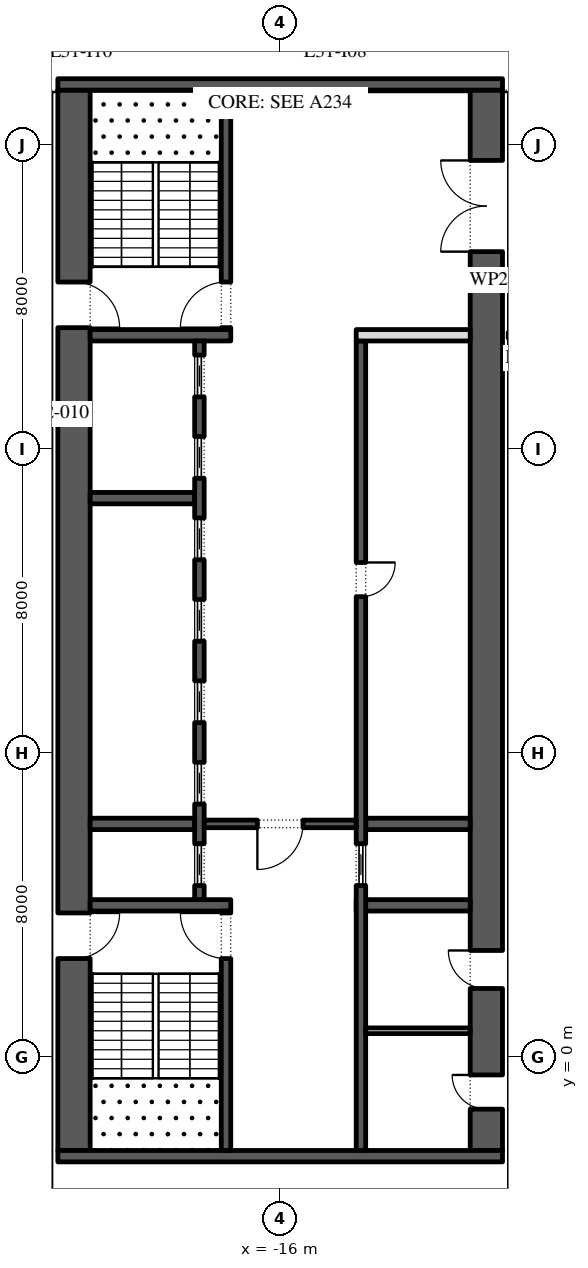
"""IFC4 building model, lengths in metres.
Left out: names, types, materials, properties, quantities, classifications, styles, units other than length and angle.
Written with IfcOpenShell. Run it as: python <this file> out.ifc"""

import sys

from ifc_helpers import new_model, si_unit, direction, frame, frame_2d, origin, place, context, subcontext, project, spatial, rectangle, extrude, element, fill, save


model = new_model("IFC4")
c1 = context("Model", 3, precision=1e-05, world=origin(), true_north=direction((0.0, 1.0)))
c2 = subcontext(c1, "Body", "Model", "MODEL_VIEW")
j1 = project(units=[si_unit("LENGTHUNIT", "METRE"), si_unit("PLANEANGLEUNIT", "RADIAN")], contexts=[c1])
p1 = place(None, origin())
s1 = spatial("IfcSite", under=j1, at=p1, CompositionType="ELEMENT")
p2 = place(p1, origin())
s2 = spatial("IfcBuilding", under=s1, at=p2, CompositionType="ELEMENT")
p3 = place(p2, frame((0.0, 0.0, 143.4)))
s3 = spatial("IfcBuildingStorey", under=s2, at=p3, CompositionType="ELEMENT", Elevation=143.4)
p4 = place(p3, frame((-21.425, -2.45, 0.0), z_axis=(0.0, 0.0, 1.0), x_axis=(0.0, 1.0, 0.0)))
e1 = element("IfcWall", 1, at=p4, inside=s3, PredefinedType="SHEAR", context=c2, shape_type="SweptSolid", body=[
    extrude(rectangle(XDim=27.9, YDim=0.85, at=frame_2d((13.95, 0.0))), origin(), (0.0, 0.0, 1.0), 4.0),
])
p5 = place(p4, frame((5.05, 0.0, 0.0)))
e2 = element("IfcOpeningElement", 2, at=p5, cuts=e1, PredefinedType="OPENING", context=c2, shape_type="SweptSolid", body=[
    extrude(rectangle(XDim=1.2, YDim=2.1, at=frame_2d((0.6, 1.05))), frame((0.0, 0.435, 0.0), z_axis=(0.0, -1.0, 0.0), x_axis=(1.0, 0.0, 0.0)), (0.0, 0.0, 1.0), 0.87),
])
p6 = place(p4, frame((21.65, 0.0, 0.0)))
e3 = element("IfcOpeningElement", 3, at=p6, cuts=e1, PredefinedType="OPENING", context=c2, shape_type="SweptSolid", body=[
    extrude(rectangle(XDim=1.2, YDim=2.1, at=frame_2d((0.6, 1.05))), frame((0.0, 0.435, 0.0), z_axis=(0.0, -1.0, 0.0), x_axis=(1.0, 0.0, 0.0)), (0.0, 0.0, 1.0), 0.87),
])
p7 = place(p3, frame((-10.575, -2.45, 0.0), z_axis=(0.0, 0.0, 1.0), x_axis=(0.0, 1.0, 0.0)))
e4 = element("IfcWall", 4, at=p7, inside=s3, PredefinedType="SHEAR", context=c2, shape_type="SweptSolid", body=[
    extrude(rectangle(XDim=27.9, YDim=0.85, at=frame_2d((13.95, 0.0))), origin(), (0.0, 0.0, 1.0), 4.0),
])
p8 = place(p7, frame((23.65, 0.0, 0.0)))
e5 = element("IfcOpeningElement", 5, at=p8, cuts=e4, PredefinedType="OPENING", context=c2, shape_type="SweptSolid", body=[
    extrude(rectangle(XDim=2.4, YDim=2.1, at=frame_2d((1.2, 1.05))), frame((0.0, 0.435, 0.0), z_axis=(0.0, -1.0, 0.0), x_axis=(1.0, 0.0, 0.0)), (0.0, 0.0, 1.0), 0.87),
])
p9 = place(p7, frame((1.087, 0.0, 0.0)))
e6 = element("IfcOpeningElement", 6, at=p9, cuts=e4, PredefinedType="OPENING", context=c2, shape_type="SweptSolid", body=[
    extrude(rectangle(XDim=0.9, YDim=2.1, at=frame_2d((0.45, 1.05))), frame((0.0, 0.435, 0.0), z_axis=(0.0, -1.0, 0.0), x_axis=(1.0, 0.0, 0.0)), (0.0, 0.0, 1.0), 0.87),
])
p10 = place(p7, frame((4.262, 0.0, 0.0)))
e7 = element("IfcOpeningElement", 7, at=p10, cuts=e4, PredefinedType="OPENING", context=c2, shape_type="SweptSolid", body=[
    extrude(rectangle(XDim=1.0, YDim=2.1, at=frame_2d((0.5, 1.05))), frame((0.0, 0.435, 0.0), z_axis=(0.0, -1.0, 0.0), x_axis=(1.0, 0.0, 0.0)), (0.0, 0.0, 1.0), 0.87),
])
for number, where, z_axis, x_axis in (
    (8, (-21.85, -2.6, 0.0), (0.0, 0.0, 1.0), (1.0, 0.0, 0.0)),
    (9, (-21.85, 25.6, 0.0), (0.0, 0.0, 1.0), (1.0, 0.0, 0.0)),
):
    element("IfcWall", number, at=place(p3, frame(where, z_axis=z_axis, x_axis=x_axis)), inside=s3, PredefinedType="SHEAR", context=c2, shape_type="SweptSolid", body=[
        extrude(rectangle(XDim=11.7, YDim=0.3, at=frame_2d((5.85, 0.0))), origin(), (0.0, 0.0, 1.0), 4.0),
    ])
p11 = place(p3, frame((-21.0, 4.0, 0.0), z_axis=(0.0, 0.0, 1.0), x_axis=(1.0, 0.0, 0.0)))
e10 = element("IfcWall", 10, at=p11, inside=s3, PredefinedType="SHEAR", context=c2, shape_type="SweptSolid", body=[
    extrude(rectangle(XDim=3.7, YDim=0.3, at=frame_2d((1.85, 0.0))), origin(), (0.0, 0.0, 1.0), 4.0),
])
p12 = place(p3, frame((-17.425, -2.45, 0.0), z_axis=(0.0, 0.0, 1.0), x_axis=(0.0, 1.0, 0.0)))
e11 = element("IfcWall", 11, at=p12, inside=s3, PredefinedType="SHEAR", context=c2, shape_type="SweptSolid", body=[
    extrude(rectangle(XDim=6.3, YDim=0.25, at=frame_2d((3.15, 0.0))), origin(), (0.0, 0.0, 1.0), 4.0),
])
p13 = place(p12, frame((5.05, 0.0, 0.0)))
e12 = element("IfcOpeningElement", 12, at=p13, cuts=e11, PredefinedType="OPENING", context=c2, shape_type="SweptSolid", body=[
    extrude(rectangle(XDim=1.2, YDim=2.1, at=frame_2d((0.6, 1.05))), frame((0.0, 0.135, 0.0), z_axis=(0.0, -1.0, 0.0), x_axis=(1.0, 0.0, 0.0)), (0.0, 0.0, 1.0), 0.27),
])
p14 = place(p3, frame((-21.0, 19.0, 0.0), z_axis=(0.0, 0.0, 1.0), x_axis=(1.0, 0.0, 0.0)))
e13 = element("IfcWall", 13, at=p14, inside=s3, PredefinedType="SHEAR", context=c2, shape_type="SweptSolid", body=[
    extrude(rectangle(XDim=3.7, YDim=0.3, at=frame_2d((1.85, 0.0))), origin(), (0.0, 0.0, 1.0), 4.0),
])
p15 = place(p3, frame((-17.425, 19.15, 0.0), z_axis=(0.0, 0.0, 1.0), x_axis=(0.0, 1.0, 0.0)))
e14 = element("IfcWall", 14, at=p15, inside=s3, PredefinedType="SHEAR", context=c2, shape_type="SweptSolid", body=[
    extrude(rectangle(XDim=6.3, YDim=0.25, at=frame_2d((3.15, 0.0))), origin(), (0.0, 0.0, 1.0), 4.0),
])
p16 = place(p15, frame((0.05, 0.0, 0.0)))
e15 = element("IfcOpeningElement", 15, at=p16, cuts=e14, PredefinedType="OPENING", context=c2, shape_type="SweptSolid", body=[
    extrude(rectangle(XDim=1.2, YDim=2.1, at=frame_2d((0.6, 1.05))), frame((0.0, 0.135, 0.0), z_axis=(0.0, -1.0, 0.0), x_axis=(1.0, 0.0, 0.0)), (0.0, 0.0, 1.0), 0.27),
])
for number, where, z_axis, x_axis in (
    (16, (-21.0, 6.143, 0.0), (0.0, 0.0, 1.0), (1.0, 0.0, 0.0)),
    (17, (-21.0, 14.714, 0.0), (0.0, 0.0, 1.0), (1.0, 0.0, 0.0)),
):
    element("IfcWall", number, at=place(p3, frame(where, z_axis=z_axis, x_axis=x_axis)), inside=s3, PredefinedType="SHEAR", context=c2, shape_type="SweptSolid", body=[
        extrude(rectangle(XDim=2.75, YDim=0.3, at=frame_2d((1.375, 0.0))), origin(), (0.0, 0.0, 1.0), 4.0),
    ])
p17 = place(p3, frame((-18.125, 4.15, 0.0), z_axis=(0.0, 0.0, 1.0), x_axis=(0.0, 1.0, 0.0)))
e18 = element("IfcWall", 18, at=p17, inside=s3, PredefinedType="SHEAR", context=c2, shape_type="SweptSolid", body=[
    extrude(rectangle(XDim=14.7, YDim=0.25, at=frame_2d((7.35, 0.0))), origin(), (0.0, 0.0, 1.0), 4.0),
])
p18 = place(p17, frame((0.371, 0.0, 0.0)))
e19 = element("IfcOpeningElement", 19, at=p18, cuts=e18, PredefinedType="OPENING", context=c2, shape_type="SweptSolid", body=[
    extrude(rectangle(XDim=1.1, YDim=2.1, at=frame_2d((0.55, 1.05))), frame((0.0, 0.135, 0.0), z_axis=(0.0, -1.0, 0.0), x_axis=(1.0, 0.0, 0.0)), (0.0, 0.0, 1.0), 0.27),
])
p19 = place(p17, frame((2.514, 0.0, 0.0)))
e20 = element("IfcOpeningElement", 20, at=p19, cuts=e18, PredefinedType="OPENING", context=c2, shape_type="SweptSolid", body=[
    extrude(rectangle(XDim=1.1, YDim=2.1, at=frame_2d((0.55, 1.05))), frame((0.0, 0.135, 0.0), z_axis=(0.0, -1.0, 0.0), x_axis=(1.0, 0.0, 0.0)), (0.0, 0.0, 1.0), 0.27),
])
p20 = place(p17, frame((4.657, 0.0, 0.0)))
e21 = element("IfcOpeningElement", 21, at=p20, cuts=e18, PredefinedType="OPENING", context=c2, shape_type="SweptSolid", body=[
    extrude(rectangle(XDim=1.1, YDim=2.1, at=frame_2d((0.55, 1.05))), frame((0.0, 0.135, 0.0), z_axis=(0.0, -1.0, 0.0), x_axis=(1.0, 0.0, 0.0)), (0.0, 0.0, 1.0), 0.27),
])
p21 = place(p17, frame((6.8, 0.0, 0.0)))
e22 = element("IfcOpeningElement", 22, at=p21, cuts=e18, PredefinedType="OPENING", context=c2, shape_type="SweptSolid", body=[
    extrude(rectangle(XDim=1.1, YDim=2.1, at=frame_2d((0.55, 1.05))), frame((0.0, 0.135, 0.0), z_axis=(0.0, -1.0, 0.0), x_axis=(1.0, 0.0, 0.0)), (0.0, 0.0, 1.0), 0.27),
])
p22 = place(p17, frame((8.943, 0.0, 0.0)))
e23 = element("IfcOpeningElement", 23, at=p22, cuts=e18, PredefinedType="OPENING", context=c2, shape_type="SweptSolid", body=[
    extrude(rectangle(XDim=1.1, YDim=2.1, at=frame_2d((0.55, 1.05))), frame((0.0, 0.135, 0.0), z_axis=(0.0, -1.0, 0.0), x_axis=(1.0, 0.0, 0.0)), (0.0, 0.0, 1.0), 0.27),
])
p23 = place(p17, frame((11.086, 0.0, 0.0)))
e24 = element("IfcOpeningElement", 24, at=p23, cuts=e18, PredefinedType="OPENING", context=c2, shape_type="SweptSolid", body=[
    extrude(rectangle(XDim=1.1, YDim=2.1, at=frame_2d((0.55, 1.05))), frame((0.0, 0.135, 0.0), z_axis=(0.0, -1.0, 0.0), x_axis=(1.0, 0.0, 0.0)), (0.0, 0.0, 1.0), 0.27),
])
p24 = place(p17, frame((13.229, 0.0, 0.0)))
e25 = element("IfcOpeningElement", 25, at=p24, cuts=e18, PredefinedType="OPENING", context=c2, shape_type="SweptSolid", body=[
    extrude(rectangle(XDim=1.1, YDim=2.1, at=frame_2d((0.55, 1.05))), frame((0.0, 0.135, 0.0), z_axis=(0.0, -1.0, 0.0), x_axis=(1.0, 0.0, 0.0)), (0.0, 0.0, 1.0), 0.27),
])
p25 = place(p3, frame((-14.0, 4.0, 0.0), z_axis=(0.0, 0.0, 1.0), x_axis=(1.0, 0.0, 0.0)))
e26 = element("IfcWall", 26, at=p25, inside=s3, PredefinedType="SHEAR", context=c2, shape_type="SweptSolid", body=[
    extrude(rectangle(XDim=3.0, YDim=0.3, at=frame_2d((1.5, 0.0))), origin(), (0.0, 0.0, 1.0), 4.0),
])
p26 = place(p3, frame((-13.75, 6.143, 0.0), z_axis=(0.0, 0.0, 1.0), x_axis=(1.0, 0.0, 0.0)))
e27 = element("IfcWall", 27, at=p26, inside=s3, PredefinedType="SHEAR", context=c2, shape_type="SweptSolid", body=[
    extrude(rectangle(XDim=2.75, YDim=0.3, at=frame_2d((1.375, 0.0))), origin(), (0.0, 0.0, 1.0), 4.0),
])
p27 = place(p3, frame((-13.875, -2.45, 0.0), z_axis=(0.0, 0.0, 1.0), x_axis=(0.0, 1.0, 0.0)))
e28 = element("IfcWall", 28, at=p27, inside=s3, PredefinedType="SHEAR", context=c2, shape_type="SweptSolid", body=[
    extrude(rectangle(XDim=21.3, YDim=0.25, at=frame_2d((10.65, 0.0))), origin(), (0.0, 0.0, 1.0), 4.0),
])
p28 = place(p27, frame((14.571, 0.0, 0.0)))
e29 = element("IfcOpeningElement", 29, at=p28, cuts=e28, PredefinedType="OPENING", context=c2, shape_type="SweptSolid", body=[
    extrude(rectangle(XDim=0.9, YDim=2.1, at=frame_2d((0.45, 1.05))), frame((0.0, 0.135, 0.0), z_axis=(0.0, -1.0, 0.0), x_axis=(1.0, 0.0, 0.0)), (0.0, 0.0, 1.0), 0.27),
])
p29 = place(p27, frame((6.971, 0.0, 0.0)))
e30 = element("IfcOpeningElement", 30, at=p29, cuts=e28, PredefinedType="OPENING", context=c2, shape_type="SweptSolid", body=[
    extrude(rectangle(XDim=1.1, YDim=2.1, at=frame_2d((0.55, 1.05))), frame((0.0, 0.135, 0.0), z_axis=(0.0, -1.0, 0.0), x_axis=(1.0, 0.0, 0.0)), (0.0, 0.0, 1.0), 0.27),
])
p30 = place(p3, frame((-14.0, 19.0, 0.0), z_axis=(0.0, 0.0, 1.0), x_axis=(1.0, 0.0, 0.0)))
e31 = element("IfcWall", 31, at=p30, inside=s3, PredefinedType="PARTITIONING", context=c2, shape_type="SweptSolid", body=[
    extrude(rectangle(XDim=3.0, YDim=0.3, at=frame_2d((1.5, 0.0))), origin(), (0.0, 0.0, 1.0), 4.0),
])
p31 = place(p3, frame((-18.0, 6.143, 0.0), z_axis=(0.0, 0.0, 1.0), x_axis=(1.0, 0.0, 0.0)))
e32 = element("IfcWall", 32, at=p31, inside=s3, PredefinedType="SHEAR", context=c2, shape_type="SweptSolid", body=[
    extrude(rectangle(XDim=4.0, YDim=0.2, at=frame_2d((2.0, 0.0))), origin(), (0.0, 0.0, 1.0), 4.0),
])
p32 = place(p31, frame((1.4, 0.0, 0.0)))
e33 = element("IfcOpeningElement", 33, at=p32, cuts=e32, PredefinedType="OPENING", context=c2, shape_type="SweptSolid", body=[
    extrude(rectangle(XDim=1.2, YDim=2.1, at=frame_2d((0.6, 1.05))), frame((0.0, 0.11, 0.0), z_axis=(0.0, -1.0, 0.0), x_axis=(1.0, 0.0, 0.0)), (0.0, 0.0, 1.0), 0.22),
])
p33 = place(p3, frame((-13.75, 0.7, 0.0), z_axis=(0.0, 0.0, 1.0), x_axis=(1.0, 0.0, 0.0)))
e34 = element("IfcWall", 34, at=p33, inside=s3, PredefinedType="PARTITIONING", context=c2, shape_type="SweptSolid", body=[
    extrude(rectangle(XDim=2.75, YDim=0.15, at=frame_2d((1.375, 0.0))), origin(), (0.0, 0.0, 1.0), 4.0),
])
p34 = place(p3, frame((-10.0, 19.0, 0.0), z_axis=(0.0, 0.0, 1.0), x_axis=(1.0, 0.0, 0.0)))
e35 = element("IfcWall", 35, at=p34, inside=s3, PredefinedType="PARTITIONING", context=c2, shape_type="SweptSolid", body=[
    extrude(rectangle(XDim=1.515, YDim=0.15, at=frame_2d((0.757, 0.0))), origin(), (0.0, 0.0, 1.0), 4.0),
])
p35 = place(p34, frame((0.258, 0.0, 0.0)))
e36 = element("IfcOpeningElement", 36, at=p35, cuts=e35, PredefinedType="OPENING", context=c2, shape_type="SweptSolid", body=[
    extrude(rectangle(XDim=1.0, YDim=2.1, at=frame_2d((0.5, 1.05))), frame((0.0, 0.085, 0.0), z_axis=(0.0, -1.0, 0.0), x_axis=(1.0, 0.0, 0.0)), (0.0, 0.0, 1.0), 0.17),
])
p36 = place(p18, origin())
e37 = element("IfcDoor", 37, at=p36, inside=s3, OperationType="SLIDING_TO_LEFT", PredefinedType="DOOR", context=c2, shape_type="SweptSolid", body=[
    extrude(rectangle(XDim=1.1, YDim=2.1, at=frame_2d((0.55, 1.05))), frame((0.0, 0.025, 0.0), z_axis=(0.0, -1.0, 0.0), x_axis=(1.0, 0.0, 0.0)), (0.0, 0.0, 1.0), 0.05),
])
fill(e19, e37)
p37 = place(p19, origin())
e38 = element("IfcDoor", 38, at=p37, inside=s3, OperationType="SLIDING_TO_LEFT", PredefinedType="DOOR", context=c2, shape_type="SweptSolid", body=[
    extrude(rectangle(XDim=1.1, YDim=2.1, at=frame_2d((0.55, 1.05))), frame((0.0, 0.025, 0.0), z_axis=(0.0, -1.0, 0.0), x_axis=(1.0, 0.0, 0.0)), (0.0, 0.0, 1.0), 0.05),
])
fill(e20, e38)
p38 = place(p20, origin())
e39 = element("IfcDoor", 39, at=p38, inside=s3, OperationType="SLIDING_TO_LEFT", PredefinedType="DOOR", context=c2, shape_type="SweptSolid", body=[
    extrude(rectangle(XDim=1.1, YDim=2.1, at=frame_2d((0.55, 1.05))), frame((0.0, 0.025, 0.0), z_axis=(0.0, -1.0, 0.0), x_axis=(1.0, 0.0, 0.0)), (0.0, 0.0, 1.0), 0.05),
])
fill(e21, e39)
p39 = place(p21, origin())
e40 = element("IfcDoor", 40, at=p39, inside=s3, OperationType="SLIDING_TO_LEFT", PredefinedType="DOOR", context=c2, shape_type="SweptSolid", body=[
    extrude(rectangle(XDim=1.1, YDim=2.1, at=frame_2d((0.55, 1.05))), frame((0.0, 0.025, 0.0), z_axis=(0.0, -1.0, 0.0), x_axis=(1.0, 0.0, 0.0)), (0.0, 0.0, 1.0), 0.05),
])
fill(e22, e40)
p40 = place(p22, origin())
e41 = element("IfcDoor", 41, at=p40, inside=s3, OperationType="SLIDING_TO_LEFT", PredefinedType="DOOR", context=c2, shape_type="SweptSolid", body=[
    extrude(rectangle(XDim=1.1, YDim=2.1, at=frame_2d((0.55, 1.05))), frame((0.0, 0.025, 0.0), z_axis=(0.0, -1.0, 0.0), x_axis=(1.0, 0.0, 0.0)), (0.0, 0.0, 1.0), 0.05),
])
fill(e23, e41)
p41 = place(p23, origin())
e42 = element("IfcDoor", 42, at=p41, inside=s3, OperationType="SLIDING_TO_LEFT", PredefinedType="DOOR", context=c2, shape_type="SweptSolid", body=[
    extrude(rectangle(XDim=1.1, YDim=2.1, at=frame_2d((0.55, 1.05))), frame((0.0, 0.025, 0.0), z_axis=(0.0, -1.0, 0.0), x_axis=(1.0, 0.0, 0.0)), (0.0, 0.0, 1.0), 0.05),
])
fill(e24, e42)
p42 = place(p24, origin())
e43 = element("IfcDoor", 43, at=p42, inside=s3, OperationType="SLIDING_TO_LEFT", PredefinedType="DOOR", context=c2, shape_type="SweptSolid", body=[
    extrude(rectangle(XDim=1.1, YDim=2.1, at=frame_2d((0.55, 1.05))), frame((0.0, 0.025, 0.0), z_axis=(0.0, -1.0, 0.0), x_axis=(1.0, 0.0, 0.0)), (0.0, 0.0, 1.0), 0.05),
])
fill(e25, e43)
p43 = place(p28, frame((0.9, -0.2, 0.0), z_axis=(0.0, 0.0, 1.0), x_axis=(-1.0, 0.0, 0.0)))
e44 = element("IfcDoor", 44, at=p43, inside=s3, OperationType="SINGLE_SWING_RIGHT", PredefinedType="DOOR", context=c2, shape_type="SweptSolid", body=[
    extrude(rectangle(XDim=0.9, YDim=2.1, at=frame_2d((0.45, 1.05))), frame((0.0, -0.075, 0.0), z_axis=(0.0, -1.0, 0.0), x_axis=(1.0, 0.0, 0.0)), (0.0, 0.0, 1.0), 0.05),
])
fill(e29, e44)
p44 = place(p29, origin())
e45 = element("IfcDoor", 45, at=p44, inside=s3, OperationType="SLIDING_TO_LEFT", PredefinedType="DOOR", context=c2, shape_type="SweptSolid", body=[
    extrude(rectangle(XDim=1.1, YDim=2.1, at=frame_2d((0.55, 1.05))), frame((0.0, 0.025, 0.0), z_axis=(0.0, -1.0, 0.0), x_axis=(1.0, 0.0, 0.0)), (0.0, 0.0, 1.0), 0.05),
])
fill(e30, e45)
p45 = place(p32, frame((1.2, 0.0, 0.0), z_axis=(0.0, 0.0, 1.0), x_axis=(-1.0, 0.0, 0.0)))
e46 = element("IfcDoor", 46, at=p45, inside=s3, OperationType="SINGLE_SWING_LEFT", PredefinedType="DOOR", context=c2, shape_type="SweptSolid", body=[
    extrude(rectangle(XDim=1.2, YDim=2.1, at=frame_2d((0.6, 1.05))), frame((0.0, 0.025, 0.0), z_axis=(0.0, -1.0, 0.0), x_axis=(1.0, 0.0, 0.0)), (0.0, 0.0, 1.0), 0.05),
])
fill(e33, e46)
p46 = place(p8, origin())
e47 = element("IfcDoor", 47, at=p46, inside=s3, OperationType="DOUBLE_DOOR_SINGLE_SWING", PredefinedType="DOOR", context=c2, shape_type="SweptSolid", body=[
    extrude(rectangle(XDim=2.4, YDim=2.1, at=frame_2d((1.2, 1.05))), frame((0.0, 0.025, 0.0), z_axis=(0.0, -1.0, 0.0), x_axis=(1.0, 0.0, 0.0)), (0.0, 0.0, 1.0), 0.05),
])
fill(e5, e47)
p47 = place(p13, origin())
e48 = element("IfcDoor", 48, at=p47, inside=s3, OperationType="SINGLE_SWING_LEFT", PredefinedType="DOOR", context=c2, shape_type="SweptSolid", body=[
    extrude(rectangle(XDim=1.2, YDim=2.1, at=frame_2d((0.6, 1.05))), frame((0.0, 0.025, 0.0), z_axis=(0.0, -1.0, 0.0), x_axis=(1.0, 0.0, 0.0)), (0.0, 0.0, 1.0), 0.05),
])
fill(e12, e48)
p48 = place(p5, frame((1.2, 0.0, 0.0), z_axis=(0.0, 0.0, 1.0), x_axis=(-1.0, 0.0, 0.0)))
e49 = element("IfcDoor", 49, at=p48, inside=s3, OperationType="SINGLE_SWING_RIGHT", PredefinedType="DOOR", context=c2, shape_type="SweptSolid", body=[
    extrude(rectangle(XDim=1.2, YDim=2.1, at=frame_2d((0.6, 1.05))), frame((0.0, 0.025, 0.0), z_axis=(0.0, -1.0, 0.0), x_axis=(1.0, 0.0, 0.0)), (0.0, 0.0, 1.0), 0.05),
])
fill(e2, e49)
p49 = place(p16, origin())
e50 = element("IfcDoor", 50, at=p49, inside=s3, OperationType="SINGLE_SWING_RIGHT", PredefinedType="DOOR", context=c2, shape_type="SweptSolid", body=[
    extrude(rectangle(XDim=1.2, YDim=2.1, at=frame_2d((0.6, 1.05))), frame((0.0, 0.025, 0.0), z_axis=(0.0, -1.0, 0.0), x_axis=(1.0, 0.0, 0.0)), (0.0, 0.0, 1.0), 0.05),
])
fill(e15, e50)
p50 = place(p6, frame((1.2, 0.0, 0.0), z_axis=(0.0, 0.0, 1.0), x_axis=(-1.0, 0.0, 0.0)))
e51 = element("IfcDoor", 51, at=p50, inside=s3, OperationType="SINGLE_SWING_LEFT", PredefinedType="DOOR", context=c2, shape_type="SweptSolid", body=[
    extrude(rectangle(XDim=1.2, YDim=2.1, at=frame_2d((0.6, 1.05))), frame((0.0, 0.025, 0.0), z_axis=(0.0, -1.0, 0.0), x_axis=(1.0, 0.0, 0.0)), (0.0, 0.0, 1.0), 0.05),
])
fill(e3, e51)
p51 = place(p9, origin())
e52 = element("IfcDoor", 52, at=p51, inside=s3, OperationType="SINGLE_SWING_LEFT", PredefinedType="DOOR", context=c2, shape_type="SweptSolid", body=[
    extrude(rectangle(XDim=0.9, YDim=2.1, at=frame_2d((0.45, 1.05))), frame((0.0, 0.425, 0.0), z_axis=(0.0, -1.0, 0.0), x_axis=(1.0, 0.0, 0.0)), (0.0, 0.0, 1.0), 0.05),
])
fill(e6, e52)
p52 = place(p10, origin())
e53 = element("IfcDoor", 53, at=p52, inside=s3, OperationType="SINGLE_SWING_LEFT", PredefinedType="DOOR", context=c2, shape_type="SweptSolid", body=[
    extrude(rectangle(XDim=1.0, YDim=2.1, at=frame_2d((0.5, 1.05))), frame((0.0, 0.425, 0.0), z_axis=(0.0, -1.0, 0.0), x_axis=(1.0, 0.0, 0.0)), (0.0, 0.0, 1.0), 0.05),
])
fill(e7, e53)
save(model, sys.argv[1])
